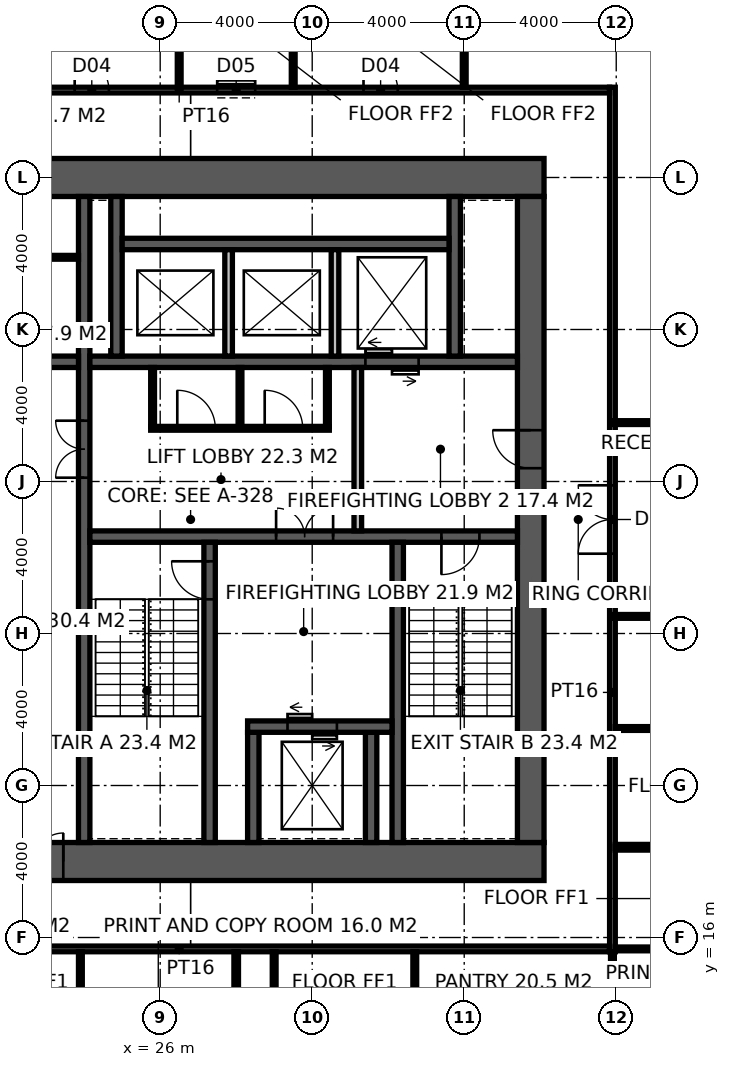
"""IFC4 building model, lengths in metres.
Left out: names, types, materials, properties, quantities, classifications, styles, units other than length and angle.
Written with IfcOpenShell. Run it as: python <this file> out.ifc"""

import sys

from ifc_helpers import new_model, si_unit, direction, frame, frame_2d, origin, place, context, subcontext, project, spatial, rectangle, extrude, element, fill, save


model = new_model("IFC4")
c1 = context("Model", 3, precision=1e-05, world=origin(), true_north=direction((0.0, 1.0)))
c2 = subcontext(c1, "Body", "Model", "MODEL_VIEW")
j1 = project(units=[si_unit("LENGTHUNIT", "METRE"), si_unit("PLANEANGLEUNIT", "RADIAN")], contexts=[c1])
p1 = place(None, origin())
s1 = spatial("IfcSite", under=j1, at=p1, CompositionType="ELEMENT")
p2 = place(p1, origin())
s2 = spatial("IfcBuilding", under=s1, at=p2, CompositionType="ELEMENT")
p3 = place(p2, frame((0.0, 0.0, 147.8)))
s3 = spatial("IfcBuildingStorey", under=s2, at=p3, CompositionType="ELEMENT", Elevation=147.8)
p4 = place(p3, frame((18.5, 18.0, -0.15), z_axis=(0.0, 0.0, 1.0), x_axis=(1.0, 0.0, 0.0)))
e1 = element("IfcWall", 1, at=p4, inside=s3, PredefinedType="SHEAR", context=c2, shape_type="SweptSolid", body=[
    extrude(rectangle(XDim=17.6, YDim=1.0, at=frame_2d((8.8, 0.0))), origin(), (0.0, 0.0, 1.0), 4.0),
])
p5 = place(p4, frame((3.45, 0.0, 0.15)))
e2 = element("IfcOpeningElement", 2, at=p5, cuts=e1, PredefinedType="OPENING", context=c2, shape_type="SweptSolid", body=[
    extrude(rectangle(XDim=1.5, YDim=2.4, at=frame_2d((0.75, 1.2))), frame((0.0, 0.51, 0.0), z_axis=(0.0, -1.0, 0.0), x_axis=(1.0, 0.0, 0.0)), (0.0, 0.0, 1.0), 1.02),
])
p6 = place(p3, frame((18.5, 36.0, -0.15), z_axis=(0.0, 0.0, 1.0), x_axis=(1.0, 0.0, 0.0)))
e3 = element("IfcWall", 3, at=p6, inside=s3, PredefinedType="SHEAR", context=c2, shape_type="SweptSolid", body=[
    extrude(rectangle(XDim=17.6, YDim=1.0, at=frame_2d((8.8, 0.0))), origin(), (0.0, 0.0, 1.0), 4.0),
])
p7 = place(p3, frame((35.75, 18.5, -0.15), z_axis=(0.0, 0.0, 1.0), x_axis=(0.0, 1.0, 0.0)))
e4 = element("IfcWall", 4, at=p7, inside=s3, PredefinedType="SHEAR", context=c2, shape_type="SweptSolid", body=[
    extrude(rectangle(XDim=17.0, YDim=0.7, at=frame_2d((8.5, 0.0))), origin(), (0.0, 0.0, 1.0), 4.0),
])
p8 = place(p7, frame((9.85, 0.0, 0.15)))
e5 = element("IfcOpeningElement", 5, at=p8, cuts=e4, PredefinedType="OPENING", context=c2, shape_type="SweptSolid", body=[
    extrude(rectangle(XDim=1.0, YDim=2.2, at=frame_2d((0.5, 1.1))), frame((0.0, 0.36, 0.0), z_axis=(0.0, -1.0, 0.0), x_axis=(1.0, 0.0, 0.0)), (0.0, 0.0, 1.0), 0.72),
])
p9 = place(p3, frame((24.0, 18.5, -0.15), z_axis=(0.0, 0.0, 1.0), x_axis=(0.0, 1.0, 0.0)))
e6 = element("IfcWall", 6, at=p9, inside=s3, PredefinedType="SHEAR", context=c2, shape_type="SweptSolid", body=[
    extrude(rectangle(XDim=17.0, YDim=0.3, at=frame_2d((8.5, 0.0))), origin(), (0.0, 0.0, 1.0), 4.0),
])
p10 = place(p9, frame((9.6, 0.0, 0.15)))
e7 = element("IfcOpeningElement", 7, at=p10, cuts=e6, PredefinedType="OPENING", context=c2, shape_type="SweptSolid", body=[
    extrude(rectangle(XDim=1.5, YDim=2.4, at=frame_2d((0.75, 1.2))), frame((0.0, 0.16, 0.0), z_axis=(0.0, -1.0, 0.0), x_axis=(1.0, 0.0, 0.0)), (0.0, 0.0, 1.0), 0.32),
])
p11 = place(p3, frame((24.15, 26.55, -0.15), z_axis=(0.0, 0.0, 1.0), x_axis=(1.0, 0.0, 0.0)))
e8 = element("IfcWall", 8, at=p11, inside=s3, PredefinedType="SHEAR", context=c2, shape_type="SweptSolid", body=[
    extrude(rectangle(XDim=11.25, YDim=0.3, at=frame_2d((5.625, 0.0))), origin(), (0.0, 0.0, 1.0), 4.0),
])
p12 = place(p11, frame((9.25, 0.0, 0.15)))
e9 = element("IfcOpeningElement", 9, at=p12, cuts=e8, PredefinedType="OPENING", context=c2, shape_type="SweptSolid", body=[
    extrude(rectangle(XDim=1.0, YDim=2.2, at=frame_2d((0.5, 1.1))), frame((0.0, 0.16, 0.0), z_axis=(0.0, -1.0, 0.0), x_axis=(1.0, 0.0, 0.0)), (0.0, 0.0, 1.0), 0.32),
])
p13 = place(p11, frame((4.9, 0.0, 0.15)))
e10 = element("IfcOpeningElement", 10, at=p13, cuts=e8, PredefinedType="OPENING", context=c2, shape_type="SweptSolid", body=[
    extrude(rectangle(XDim=1.5, YDim=2.4, at=frame_2d((0.75, 1.2))), frame((0.0, 0.16, 0.0), z_axis=(0.0, -1.0, 0.0), x_axis=(1.0, 0.0, 0.0)), (0.0, 0.0, 1.0), 0.32),
])
p14 = place(p3, frame((27.3, 18.5, -0.15), z_axis=(0.0, 0.0, 1.0), x_axis=(0.0, 1.0, 0.0)))
e11 = element("IfcWall", 11, at=p14, inside=s3, PredefinedType="SHEAR", context=c2, shape_type="SweptSolid", body=[
    extrude(rectangle(XDim=7.9, YDim=0.3, at=frame_2d((3.95, 0.0))), origin(), (0.0, 0.0, 1.0), 4.0),
])
p15 = place(p14, frame((6.4, 0.0, 0.15)))
e12 = element("IfcOpeningElement", 12, at=p15, cuts=e11, PredefinedType="OPENING", context=c2, shape_type="SweptSolid", body=[
    extrude(rectangle(XDim=1.0, YDim=2.2, at=frame_2d((0.5, 1.1))), frame((0.0, 0.16, 0.0), z_axis=(0.0, -1.0, 0.0), x_axis=(1.0, 0.0, 0.0)), (0.0, 0.0, 1.0), 0.32),
])
p16 = place(p3, frame((32.25, 18.5, -0.15), z_axis=(0.0, 0.0, 1.0), x_axis=(0.0, 1.0, 0.0)))
e13 = element("IfcWall", 13, at=p16, inside=s3, PredefinedType="SHEAR", context=c2, shape_type="SweptSolid", body=[
    extrude(rectangle(XDim=7.9, YDim=0.3, at=frame_2d((3.95, 0.0))), origin(), (0.0, 0.0, 1.0), 4.0),
])
for number, where, z_axis, x_axis in (
    (14, (28.45, 18.5, -0.15), (0.0, 0.0, 1.0), (0.0, 1.0, 0.0)),
    (15, (31.55, 18.5, -0.15), (0.0, 0.0, 1.0), (0.0, 1.0, 0.0)),
):
    element("IfcWall", number, at=place(p3, frame(where, z_axis=z_axis, x_axis=x_axis)), inside=s3, PredefinedType="SHEAR", context=c2, shape_type="SweptSolid", body=[
        extrude(rectangle(XDim=2.9, YDim=0.3, at=frame_2d((1.45, 0.0))), origin(), (0.0, 0.0, 1.0), 4.0),
    ])
p17 = place(p3, frame((28.3, 21.55, -0.15), z_axis=(0.0, 0.0, 1.0), x_axis=(1.0, 0.0, 0.0)))
e16 = element("IfcWall", 16, at=p17, inside=s3, PredefinedType="SHEAR", context=c2, shape_type="SweptSolid", body=[
    extrude(rectangle(XDim=3.8, YDim=0.3, at=frame_2d((1.9, 0.0))), origin(), (0.0, 0.0, 1.0), 4.0),
])
p18 = place(p17, frame((1.05, 0.0, 0.15)))
e17 = element("IfcOpeningElement", 17, at=p18, cuts=e16, PredefinedType="OPENING", context=c2, shape_type="SweptSolid", body=[
    extrude(rectangle(XDim=1.3, YDim=2.4, at=frame_2d((0.65, 1.2))), frame((0.0, 0.16, 0.0), z_axis=(0.0, -1.0, 0.0), x_axis=(1.0, 0.0, 0.0)), (0.0, 0.0, 1.0), 0.32),
])
p19 = place(p3, frame((24.15, 31.15, -0.15), z_axis=(0.0, 0.0, 1.0), x_axis=(1.0, 0.0, 0.0)))
e18 = element("IfcWall", 18, at=p19, inside=s3, PredefinedType="SHEAR", context=c2, shape_type="SweptSolid", body=[
    extrude(rectangle(XDim=11.25, YDim=0.3, at=frame_2d((5.625, 0.0))), origin(), (0.0, 0.0, 1.0), 4.0),
])
p20 = place(p19, frame((7.25, 0.0, 0.15)))
e19 = element("IfcOpeningElement", 19, at=p20, cuts=e18, PredefinedType="OPENING", context=c2, shape_type="SweptSolid", body=[
    extrude(rectangle(XDim=1.4, YDim=2.4, at=frame_2d((0.7, 1.2))), frame((0.0, 0.16, 0.0), z_axis=(0.0, -1.0, 0.0), x_axis=(1.0, 0.0, 0.0)), (0.0, 0.0, 1.0), 0.32),
])
p21 = place(p3, frame((18.5, 31.15, -0.15), z_axis=(0.0, 0.0, 1.0), x_axis=(1.0, 0.0, 0.0)))
e20 = element("IfcWall", 20, at=p21, inside=s3, PredefinedType="SHEAR", context=c2, shape_type="SweptSolid", body=[
    extrude(rectangle(XDim=5.35, YDim=0.3, at=frame_2d((2.675, 0.0))), origin(), (0.0, 0.0, 1.0), 4.0),
])
p22 = place(p21, frame((3.4, 0.0, 0.15)))
e21 = element("IfcOpeningElement", 21, at=p22, cuts=e20, PredefinedType="OPENING", context=c2, shape_type="SweptSolid", body=[
    extrude(rectangle(XDim=1.0, YDim=2.2, at=frame_2d((0.5, 1.1))), frame((0.0, 0.16, 0.0), z_axis=(0.0, -1.0, 0.0), x_axis=(1.0, 0.0, 0.0)), (0.0, 0.0, 1.0), 0.32),
])
for number, where, z_axis, x_axis in (
    (22, (24.85, 31.3, -0.15), (0.0, 0.0, 1.0), (0.0, 1.0, 0.0)),
    (23, (33.75, 31.3, -0.15), (0.0, 0.0, 1.0), (0.0, 1.0, 0.0)),
):
    element("IfcWall", number, at=place(p3, frame(where, z_axis=z_axis, x_axis=x_axis)), inside=s3, PredefinedType="SHEAR", context=c2, shape_type="SweptSolid", body=[
        extrude(rectangle(XDim=4.2, YDim=0.3, at=frame_2d((2.1, 0.0))), origin(), (0.0, 0.0, 1.0), 4.0),
    ])
p23 = place(p3, frame((25.0, 34.25, -0.15), z_axis=(0.0, 0.0, 1.0), x_axis=(1.0, 0.0, 0.0)))
e24 = element("IfcWall", 24, at=p23, inside=s3, PredefinedType="SHEAR", context=c2, shape_type="SweptSolid", body=[
    extrude(rectangle(XDim=8.6, YDim=0.3, at=frame_2d((4.3, 0.0))), origin(), (0.0, 0.0, 1.0), 4.0),
])
for number, where, z_axis, x_axis in (
    (25, (27.8, 31.3, -0.15), (0.0, 0.0, 1.0), (0.0, 1.0, 0.0)),
    (26, (30.6, 31.3, -0.15), (0.0, 0.0, 1.0), (0.0, 1.0, 0.0)),
):
    element("IfcWall", number, at=place(p3, frame(where, z_axis=z_axis, x_axis=x_axis)), inside=s3, PredefinedType="SOLIDWALL", context=c2, shape_type="SweptSolid", body=[
        extrude(rectangle(XDim=2.8, YDim=0.2, at=frame_2d((1.4, 0.0))), origin(), (0.0, 0.0, 1.0), 4.0),
    ])
p24 = place(p3, frame((31.2, 26.7, 0.0), z_axis=(0.0, 0.0, 1.0), x_axis=(0.0, 1.0, 0.0)))
e27 = element("IfcWall", 27, at=p24, inside=s3, PredefinedType="SOLIDWALL", context=c2, shape_type="SweptSolid", body=[
    extrude(rectangle(XDim=4.3, YDim=0.2, at=frame_2d((2.15, 0.0))), origin(), (0.0, 0.0, 1.0), 3.85),
])
p25 = place(p3, frame((18.5, 33.9, 0.0), z_axis=(0.0, 0.0, 1.0), x_axis=(1.0, 0.0, 0.0)))
e28 = element("IfcWall", 28, at=p25, inside=s3, PredefinedType="PARTITIONING", context=c2, shape_type="SweptSolid", body=[
    extrude(rectangle(XDim=5.35, YDim=0.1, at=frame_2d((2.675, 0.0))), origin(), (0.0, 0.0, 1.0), 3.85),
])
p26 = place(p25, frame((1.2, 0.0, 0.0)))
e29 = element("IfcOpeningElement", 29, at=p26, cuts=e28, PredefinedType="OPENING", context=c2, shape_type="SweptSolid", body=[
    extrude(rectangle(XDim=1.0, YDim=2.2, at=frame_2d((0.5, 1.1))), frame((0.0, 0.06, 0.0), z_axis=(0.0, -1.0, 0.0), x_axis=(1.0, 0.0, 0.0)), (0.0, 0.0, 1.0), 0.12),
])
p27 = place(p3, frame((25.75, 29.4, 0.0), z_axis=(0.0, 0.0, 1.0), x_axis=(1.0, 0.0, 0.0)))
e30 = element("IfcWall", 30, at=p27, inside=s3, PredefinedType="PARTITIONING", context=c2, shape_type="SweptSolid", body=[
    extrude(rectangle(XDim=4.7, YDim=0.1, at=frame_2d((2.35, 0.0))), origin(), (0.0, 0.0, 1.0), 3.85),
])
p28 = place(p27, frame((0.7, 0.0, 0.0)))
e31 = element("IfcOpeningElement", 31, at=p28, cuts=e30, PredefinedType="OPENING", context=c2, shape_type="SweptSolid", body=[
    extrude(rectangle(XDim=1.0, YDim=2.2, at=frame_2d((0.5, 1.1))), frame((0.0, 0.06, 0.0), z_axis=(0.0, -1.0, 0.0), x_axis=(1.0, 0.0, 0.0)), (0.0, 0.0, 1.0), 0.12),
])
p29 = place(p27, frame((3.0, 0.0, 0.0)))
e32 = element("IfcOpeningElement", 32, at=p29, cuts=e30, PredefinedType="OPENING", context=c2, shape_type="SweptSolid", body=[
    extrude(rectangle(XDim=1.0, YDim=2.2, at=frame_2d((0.5, 1.1))), frame((0.0, 0.06, 0.0), z_axis=(0.0, -1.0, 0.0), x_axis=(1.0, 0.0, 0.0)), (0.0, 0.0, 1.0), 0.12),
])
for number, where, z_axis, x_axis in (
    (33, (25.8, 29.45, 0.0), (0.0, 0.0, 1.0), (0.0, 1.0, 0.0)),
    (34, (30.4, 29.45, 0.0), (0.0, 0.0, 1.0), (0.0, 1.0, 0.0)),
    (35, (28.1, 29.45, 0.0), (0.0, 0.0, 1.0), (0.0, 1.0, 0.0)),
):
    element("IfcWall", number, at=place(p3, frame(where, z_axis=z_axis, x_axis=x_axis)), inside=s3, PredefinedType="PARTITIONING", context=c2, shape_type="SweptSolid", body=[
        extrude(rectangle(XDim=1.55, YDim=0.1, at=frame_2d((0.775, 0.0))), origin(), (0.0, 0.0, 1.0), 3.85),
    ])
p30 = place(p3, frame((37.9, 15.625, 0.0), z_axis=(0.0, 0.0, 1.0), x_axis=(0.0, 1.0, 0.0)))
e36 = element("IfcWall", 36, at=p30, inside=s3, PredefinedType="PARTITIONING", context=c2, shape_type="SweptSolid", body=[
    extrude(rectangle(XDim=22.75, YDim=0.15, at=frame_2d((11.375, 0.0))), origin(), (0.0, 0.0, 1.0), 2.95),
])
p31 = place(p30, frame((10.475, 0.0, 0.0)))
e37 = element("IfcOpeningElement", 37, at=p31, cuts=e36, PredefinedType="OPENING", context=c2, shape_type="SweptSolid", body=[
    extrude(rectangle(XDim=1.8, YDim=2.4, at=frame_2d((0.9, 1.2))), frame((0.0, 0.085, 0.0), z_axis=(0.0, -1.0, 0.0), x_axis=(1.0, 0.0, 0.0)), (0.0, 0.0, 1.0), 0.17),
])
p32 = place(p3, frame((15.175, 15.7, 0.0), z_axis=(0.0, 0.0, 1.0), x_axis=(1.0, 0.0, 0.0)))
e38 = element("IfcWall", 38, at=p32, inside=s3, PredefinedType="PARTITIONING", context=c2, shape_type="SweptSolid", body=[
    extrude(rectangle(XDim=22.65, YDim=0.15, at=frame_2d((11.325, 0.0))), origin(), (0.0, 0.0, 1.0), 3.85),
])
p33 = place(p3, frame((15.175, 38.3, 0.0), z_axis=(0.0, 0.0, 1.0), x_axis=(1.0, 0.0, 0.0)))
e39 = element("IfcWall", 39, at=p33, inside=s3, PredefinedType="PARTITIONING", context=c2, shape_type="SweptSolid", body=[
    extrude(rectangle(XDim=22.65, YDim=0.15, at=frame_2d((11.325, 0.0))), origin(), (0.0, 0.0, 1.0), 3.85),
])
p34 = place(p33, frame((8.575, 0.0, 0.0)))
e40 = element("IfcOpeningElement", 40, at=p34, cuts=e39, PredefinedType="OPENING", context=c2, shape_type="SweptSolid", body=[
    extrude(rectangle(XDim=0.9, YDim=2.1, at=frame_2d((0.45, 1.05))), frame((0.0, 0.085, 0.0), z_axis=(0.0, -1.0, 0.0), x_axis=(1.0, 0.0, 0.0)), (0.0, 0.0, 1.0), 0.17),
])
p35 = place(p33, frame((12.325, 0.0, 0.0)))
e41 = element("IfcOpeningElement", 41, at=p35, cuts=e39, PredefinedType="OPENING", context=c2, shape_type="SweptSolid", body=[
    extrude(rectangle(XDim=1.0, YDim=2.1, at=frame_2d((0.5, 1.05))), frame((0.0, 0.085, 0.0), z_axis=(0.0, -1.0, 0.0), x_axis=(1.0, 0.0, 0.0)), (0.0, 0.0, 1.0), 0.17),
])
p36 = place(p33, frame((16.175, 0.0, 0.0)))
e42 = element("IfcOpeningElement", 42, at=p36, cuts=e39, PredefinedType="OPENING", context=c2, shape_type="SweptSolid", body=[
    extrude(rectangle(XDim=0.9, YDim=2.1, at=frame_2d((0.45, 1.05))), frame((0.0, 0.085, 0.0), z_axis=(0.0, -1.0, 0.0), x_axis=(1.0, 0.0, 0.0)), (0.0, 0.0, 1.0), 0.17),
])
p37 = place(p3, frame((34.0, 38.375, 0.0), z_axis=(0.0, 0.0, 1.0), x_axis=(0.0, 1.0, 0.0)))
e43 = element("IfcWall", 43, at=p37, inside=s3, PredefinedType="PARTITIONING", context=c2, shape_type="SweptSolid", body=[
    extrude(rectangle(XDim=3.675, YDim=0.1, at=frame_2d((1.837, 0.0))), origin(), (0.0, 0.0, 1.0), 2.95),
])
for number, where, z_axis, x_axis in (
    (44, (26.5, 38.375, 0.0), (0.0, 0.0, 1.0), (0.0, 1.0, 0.0)),
    (45, (29.5, 38.375, 0.0), (0.0, 0.0, 1.0), (0.0, 1.0, 0.0)),
):
    element("IfcWall", number, at=place(p3, frame(where, z_axis=z_axis, x_axis=x_axis)), inside=s3, PredefinedType="PARTITIONING", context=c2, shape_type="SweptSolid", body=[
        extrude(rectangle(XDim=3.575, YDim=0.1, at=frame_2d((1.788, 0.0))), origin(), (0.0, 0.0, 1.0), 3.85),
    ])
p38 = place(p3, frame((28.0, 4.3, 0.0), z_axis=(0.0, 0.0, 1.0), x_axis=(0.0, 1.0, 0.0)))
e46 = element("IfcWall", 46, at=p38, inside=s3, PredefinedType="PARTITIONING", context=c2, shape_type="SweptSolid", body=[
    extrude(rectangle(XDim=11.325, YDim=0.12, at=frame_2d((5.663, 0.0))), origin(), (0.0, 0.0, 1.0), 3.85),
])
for number, where, z_axis, x_axis in (
    (47, (37.975, 15.7, 0.0), (0.0, 0.0, 1.0), (1.0, 0.0, 0.0)),
    (48, (37.975, 18.35, 0.0), (0.0, 0.0, 1.0), (1.0, 0.0, 0.0)),
    (49, (37.975, 18.4, 0.0), (0.0, 0.0, 1.0), (1.0, 0.0, 0.0)),
    (50, (37.975, 21.5, 0.0), (0.0, 0.0, 1.0), (1.0, 0.0, 0.0)),
):
    element("IfcWall", number, at=place(p3, frame(where, z_axis=z_axis, x_axis=x_axis)), inside=s3, PredefinedType="PARTITIONING", context=c2, shape_type="SweptSolid", body=[
        extrude(rectangle(XDim=3.575, YDim=0.1, at=frame_2d((1.788, 0.0))), origin(), (0.0, 0.0, 1.0), 3.85),
    ])
for number, where, z_axis, x_axis in (
    (51, (23.9, 11.55, 0.0), (0.0, 0.0, 1.0), (0.0, 1.0, 0.0)),
    (52, (28.999, 11.55, 0.0), (0.0, 0.0, 1.0), (0.0, 1.0, 0.0)),
    (53, (32.699, 11.55, 0.0), (0.0, 0.0, 1.0), (0.0, 1.0, 0.0)),
):
    element("IfcWall", number, at=place(p3, frame(where, z_axis=z_axis, x_axis=x_axis)), inside=s3, PredefinedType="PARTITIONING", context=c2, shape_type="SweptSolid", body=[
        extrude(rectangle(XDim=4.075, YDim=0.1, at=frame_2d((2.038, 0.0))), origin(), (0.0, 0.0, 1.0), 3.85),
    ])
p39 = place(p3, frame((37.9, 11.55, 0.0), z_axis=(0.0, 0.0, 1.0), x_axis=(0.0, 1.0, 0.0)))
e54 = element("IfcWall", 54, at=p39, inside=s3, PredefinedType="PARTITIONING", context=c2, shape_type="SweptSolid", body=[
    extrude(rectangle(XDim=4.075, YDim=0.1, at=frame_2d((2.038, 0.0))), origin(), (0.0, 0.0, 1.0), 2.95),
])
for number, where, z_axis, x_axis in (
    (55, (37.9, 24.45, 0.0), (0.0, 0.0, 1.0), (1.0, 0.0, 0.0)),
    (56, (42.4, 29.55, 0.0), (0.0, 0.0, 1.0), (-1.0, 0.0, 0.0)),
):
    element("IfcWall", number, at=place(p3, frame(where, z_axis=z_axis, x_axis=x_axis)), inside=s3, PredefinedType="PARTITIONING", context=c2, shape_type="SweptSolid", body=[
        extrude(rectangle(XDim=4.5, YDim=0.1, at=frame_2d((2.25, 0.0))), origin(), (0.0, 0.0, 1.0), 3.85),
    ])
p40 = place(p15, origin())
e57 = element("IfcDoor", 57, at=p40, inside=s3, OperationType="SINGLE_SWING_RIGHT", PredefinedType="DOOR", context=c2, shape_type="SweptSolid", body=[
    extrude(rectangle(XDim=1.0, YDim=2.2, at=frame_2d((0.5, 1.1))), frame((0.0, 0.025, 0.0), z_axis=(0.0, -1.0, 0.0), x_axis=(1.0, 0.0, 0.0)), (0.0, 0.0, 1.0), 0.05),
])
fill(e12, e57)
p41 = place(p12, frame((1.0, 0.0, 0.0), z_axis=(0.0, 0.0, 1.0), x_axis=(-1.0, 0.0, 0.0)))
e58 = element("IfcDoor", 58, at=p41, inside=s3, OperationType="SINGLE_SWING_RIGHT", PredefinedType="DOOR", context=c2, shape_type="SweptSolid", body=[
    extrude(rectangle(XDim=1.0, YDim=2.2, at=frame_2d((0.5, 1.1))), frame((0.0, 0.025, 0.0), z_axis=(0.0, -1.0, 0.0), x_axis=(1.0, 0.0, 0.0)), (0.0, 0.0, 1.0), 0.05),
])
fill(e9, e58)
p42 = place(p8, origin())
e59 = element("IfcDoor", 59, at=p42, inside=s3, OperationType="SINGLE_SWING_RIGHT", PredefinedType="DOOR", context=c2, shape_type="SweptSolid", body=[
    extrude(rectangle(XDim=1.0, YDim=2.2, at=frame_2d((0.5, 1.1))), frame((0.0, 0.025, 0.0), z_axis=(0.0, -1.0, 0.0), x_axis=(1.0, 0.0, 0.0)), (0.0, 0.0, 1.0), 0.05),
])
fill(e5, e59)
p43 = place(p13, origin())
e60 = element("IfcDoor", 60, at=p43, inside=s3, OperationType="DOUBLE_DOOR_DOUBLE_SWING", PredefinedType="DOOR", context=c2, shape_type="SweptSolid", body=[
    extrude(rectangle(XDim=1.5, YDim=2.4, at=frame_2d((0.75, 1.2))), frame((0.0, 0.025, 0.0), z_axis=(0.0, -1.0, 0.0), x_axis=(1.0, 0.0, 0.0)), (0.0, 0.0, 1.0), 0.05),
])
fill(e10, e60)
p44 = place(p10, origin())
e61 = element("IfcDoor", 61, at=p44, inside=s3, OperationType="DOUBLE_DOOR_DOUBLE_SWING", PredefinedType="DOOR", context=c2, shape_type="SweptSolid", body=[
    extrude(rectangle(XDim=1.5, YDim=2.4, at=frame_2d((0.75, 1.2))), frame((0.0, 0.025, 0.0), z_axis=(0.0, -1.0, 0.0), x_axis=(1.0, 0.0, 0.0)), (0.0, 0.0, 1.0), 0.05),
])
fill(e7, e61)
p45 = place(p28, origin())
e62 = element("IfcDoor", 62, at=p45, inside=s3, OperationType="SINGLE_SWING_LEFT", PredefinedType="DOOR", context=c2, shape_type="SweptSolid", body=[
    extrude(rectangle(XDim=1.0, YDim=2.2, at=frame_2d((0.5, 1.1))), frame((0.0, 0.025, 0.0), z_axis=(0.0, -1.0, 0.0), x_axis=(1.0, 0.0, 0.0)), (0.0, 0.0, 1.0), 0.05),
])
fill(e31, e62)
p46 = place(p29, origin())
e63 = element("IfcDoor", 63, at=p46, inside=s3, OperationType="SINGLE_SWING_LEFT", PredefinedType="DOOR", context=c2, shape_type="SweptSolid", body=[
    extrude(rectangle(XDim=1.0, YDim=2.2, at=frame_2d((0.5, 1.1))), frame((0.0, 0.025, 0.0), z_axis=(0.0, -1.0, 0.0), x_axis=(1.0, 0.0, 0.0)), (0.0, 0.0, 1.0), 0.05),
])
fill(e32, e63)
p47 = place(p5, origin())
e64 = element("IfcDoor", 64, at=p47, inside=s3, OperationType="DOUBLE_DOOR_DOUBLE_SWING", PredefinedType="DOOR", context=c2, shape_type="SweptSolid", body=[
    extrude(rectangle(XDim=1.5, YDim=2.4, at=frame_2d((0.75, 1.2))), frame((0.0, 0.025, 0.0), z_axis=(0.0, -1.0, 0.0), x_axis=(1.0, 0.0, 0.0)), (0.0, 0.0, 1.0), 0.05),
])
fill(e2, e64)
p48 = place(p34, origin())
e65 = element("IfcDoor", 65, at=p48, inside=s3, OperationType="SINGLE_SWING_LEFT", PredefinedType="DOOR", context=c2, shape_type="SweptSolid", body=[
    extrude(rectangle(XDim=0.9, YDim=2.1, at=frame_2d((0.45, 1.05))), frame((0.0, 0.025, 0.0), z_axis=(0.0, -1.0, 0.0), x_axis=(1.0, 0.0, 0.0)), (0.0, 0.0, 1.0), 0.05),
])
fill(e40, e65)
p49 = place(p35, origin())
e66 = element("IfcDoor", 66, at=p49, inside=s3, OperationType="SLIDING_TO_LEFT", PredefinedType="DOOR", context=c2, shape_type="SweptSolid", body=[
    extrude(rectangle(XDim=1.0, YDim=2.1, at=frame_2d((0.5, 1.05))), frame((0.0, 0.025, 0.0), z_axis=(0.0, -1.0, 0.0), x_axis=(1.0, 0.0, 0.0)), (0.0, 0.0, 1.0), 0.05),
])
fill(e41, e66)
p50 = place(p36, origin())
e67 = element("IfcDoor", 67, at=p50, inside=s3, OperationType="SINGLE_SWING_LEFT", PredefinedType="DOOR", context=c2, shape_type="SweptSolid", body=[
    extrude(rectangle(XDim=0.9, YDim=2.1, at=frame_2d((0.45, 1.05))), frame((0.0, 0.025, 0.0), z_axis=(0.0, -1.0, 0.0), x_axis=(1.0, 0.0, 0.0)), (0.0, 0.0, 1.0), 0.05),
])
fill(e42, e67)
p51 = place(p31, origin())
e68 = element("IfcDoor", 68, at=p51, inside=s3, OperationType="DOUBLE_DOOR_DOUBLE_SWING", PredefinedType="DOOR", context=c2, shape_type="SweptSolid", body=[
    extrude(rectangle(XDim=1.8, YDim=2.4, at=frame_2d((0.9, 1.2))), frame((0.0, 0.025, 0.0), z_axis=(0.0, -1.0, 0.0), x_axis=(1.0, 0.0, 0.0)), (0.0, 0.0, 1.0), 0.05),
])
fill(e37, e68)
p52 = place(p18, origin())
e69 = element("IfcDoor", 69, at=p52, inside=s3, OperationType="DOUBLE_DOOR_SLIDING", PredefinedType="DOOR", context=c2, shape_type="SweptSolid", body=[
    extrude(rectangle(XDim=1.3, YDim=2.4, at=frame_2d((0.65, 1.2))), frame((0.0, 0.025, 0.0), z_axis=(0.0, -1.0, 0.0), x_axis=(1.0, 0.0, 0.0)), (0.0, 0.0, 1.0), 0.05),
])
fill(e17, e69)
p53 = place(p20, origin())
e70 = element("IfcDoor", 70, at=p53, inside=s3, OperationType="DOUBLE_DOOR_SLIDING", PredefinedType="DOOR", context=c2, shape_type="SweptSolid", body=[
    extrude(rectangle(XDim=1.4, YDim=2.4, at=frame_2d((0.7, 1.2))), frame((0.0, 0.025, 0.0), z_axis=(0.0, -1.0, 0.0), x_axis=(1.0, 0.0, 0.0)), (0.0, 0.0, 1.0), 0.05),
])
fill(e19, e70)
save(model, sys.argv[1])
